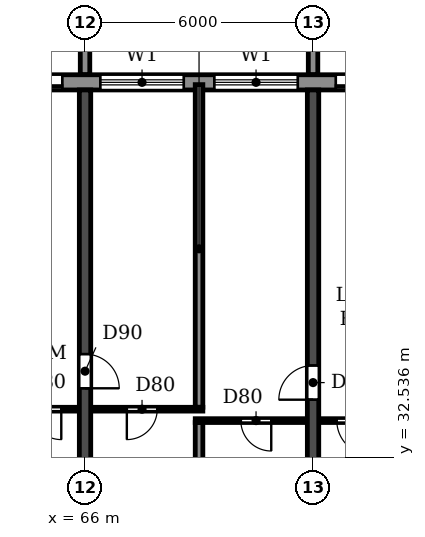
"""IFC4 building model, lengths in metres.
Left out: names, types, materials, properties, quantities, classifications, styles, units other than length and angle.
Written with IfcOpenShell. Run it as: python <this file> out.ifc"""

import sys

from ifc_helpers import new_model, si_unit, direction, frame, frame_2d, origin, place, context, subcontext, project, spatial, polyline, rectangle, outline, extrude, source, transform, mapped, element, fill, save


model = new_model("IFC4")
c1 = context("Model", 3, precision=1e-05, world=origin(), true_north=direction((0.0, 1.0)))
c2 = subcontext(c1, "Body", "Model", "MODEL_VIEW")
j1 = project(units=[si_unit("LENGTHUNIT", "METRE"), si_unit("PLANEANGLEUNIT", "RADIAN")], contexts=[c1])
p1 = place(None, origin())
s1 = spatial("IfcSite", under=j1, at=p1, CompositionType="ELEMENT")
p2 = place(p1, origin())
s2 = spatial("IfcBuilding", under=s1, at=p2, CompositionType="ELEMENT")
p3 = place(p2, frame((0.0, 0.0, 152.1)))
s3 = spatial("IfcBuildingStorey", under=s2, at=p3, CompositionType="ELEMENT", Elevation=152.1)
p4 = place(p3, frame((66.0, 30.525, 0.0), z_axis=(0.0, 0.0, 1.0), x_axis=(0.0, 1.0, 0.0)))
e1 = element("IfcWall", 1, at=p4, inside=s3, PredefinedType="SHEAR", context=c2, shape_type="SweptSolid", body=[
    extrude(rectangle(XDim=11.675, YDim=0.3, at=frame_2d((5.837, 0.0))), origin(), (0.0, 0.0, 1.0), 3.07),
])
p5 = place(p4, frame((3.825, 0.0, 0.0)))
e2 = element("IfcOpeningElement", 2, at=p5, cuts=e1, PredefinedType="OPENING", context=c2, shape_type="SweptSolid", body=[
    extrude(rectangle(XDim=0.9, YDim=2.1, at=frame_2d((0.45, 1.05))), frame((0.0, 0.16, 0.0), z_axis=(0.0, -1.0, 0.0), x_axis=(1.0, 0.0, 0.0)), (0.0, 0.0, 1.0), 0.32),
])
p6 = place(p3, frame((72.0, 30.525, 0.0), z_axis=(0.0, 0.0, 1.0), x_axis=(0.0, 1.0, 0.0)))
e3 = element("IfcWall", 3, at=p6, inside=s3, PredefinedType="SHEAR", context=c2, shape_type="SweptSolid", body=[
    extrude(rectangle(XDim=11.675, YDim=0.3, at=frame_2d((5.837, 0.0))), origin(), (0.0, 0.0, 1.0), 3.07),
])
p7 = place(p6, frame((3.525, 0.0, 0.0)))
e4 = element("IfcOpeningElement", 4, at=p7, cuts=e3, PredefinedType="OPENING", context=c2, shape_type="SweptSolid", body=[
    extrude(rectangle(XDim=0.9, YDim=2.1, at=frame_2d((0.45, 1.05))), frame((0.0, 0.16, 0.0), z_axis=(0.0, -1.0, 0.0), x_axis=(1.0, 0.0, 0.0)), (0.0, 0.0, 1.0), 0.32),
])
p8 = place(p3, frame((85.317, 42.4, 0.0), z_axis=(0.0, 0.0, 1.0), x_axis=(-1.0, 0.0, 0.0)))
e5 = element("IfcWall", 5, at=p8, inside=s3, PredefinedType="STANDARD", context=c2, shape_type="SweptSolid", body=[
    extrude(rectangle(XDim=68.634, YDim=0.4, at=frame_2d((34.317, 0.0))), origin(), (0.0, 0.0, 1.0), 3.07),
])
p9 = place(p8, frame((64.917, 0.0, 0.0)))
e6 = element("IfcOpeningElement", 6, at=p9, cuts=e5, PredefinedType="OPENING", context=c2, shape_type="SweptSolid", body=[
    extrude(rectangle(XDim=1.8, YDim=2.4, at=frame_2d((0.9, 1.2))), frame((0.0, 0.21, 0.0), z_axis=(0.0, -1.0, 0.0), x_axis=(1.0, 0.0, 0.0)), (0.0, 0.0, 1.0), 0.42),
])
p10 = place(p8, frame((61.717, 0.0, 0.9)))
e7 = element("IfcOpeningElement", 7, at=p10, cuts=e5, PredefinedType="OPENING", context=c2, shape_type="SweptSolid", body=[
    extrude(rectangle(XDim=2.2, YDim=1.5, at=frame_2d((1.1, 0.75))), frame((0.0, 0.21, 0.0), z_axis=(0.0, -1.0, 0.0), x_axis=(1.0, 0.0, 0.0)), (0.0, 0.0, 1.0), 0.42),
])
p11 = place(p8, frame((58.717, 0.0, 0.9)))
e8 = element("IfcOpeningElement", 8, at=p11, cuts=e5, PredefinedType="OPENING", context=c2, shape_type="SweptSolid", body=[
    extrude(rectangle(XDim=2.2, YDim=1.5, at=frame_2d((1.1, 0.75))), frame((0.0, 0.21, 0.0), z_axis=(0.0, -1.0, 0.0), x_axis=(1.0, 0.0, 0.0)), (0.0, 0.0, 1.0), 0.42),
])
p12 = place(p8, frame((55.917, 0.0, 0.0)))
e9 = element("IfcOpeningElement", 9, at=p12, cuts=e5, PredefinedType="OPENING", context=c2, shape_type="SweptSolid", body=[
    extrude(rectangle(XDim=1.8, YDim=2.4, at=frame_2d((0.9, 1.2))), frame((0.0, 0.21, 0.0), z_axis=(0.0, -1.0, 0.0), x_axis=(1.0, 0.0, 0.0)), (0.0, 0.0, 1.0), 0.42),
])
p13 = place(p8, frame((52.917, 0.0, 0.0)))
e10 = element("IfcOpeningElement", 10, at=p13, cuts=e5, PredefinedType="OPENING", context=c2, shape_type="SweptSolid", body=[
    extrude(rectangle(XDim=1.8, YDim=2.4, at=frame_2d((0.9, 1.2))), frame((0.0, 0.21, 0.0), z_axis=(0.0, -1.0, 0.0), x_axis=(1.0, 0.0, 0.0)), (0.0, 0.0, 1.0), 0.42),
])
p14 = place(p8, frame((49.717, 0.0, 0.9)))
e11 = element("IfcOpeningElement", 11, at=p14, cuts=e5, PredefinedType="OPENING", context=c2, shape_type="SweptSolid", body=[
    extrude(rectangle(XDim=2.2, YDim=1.5, at=frame_2d((1.1, 0.75))), frame((0.0, 0.21, 0.0), z_axis=(0.0, -1.0, 0.0), x_axis=(1.0, 0.0, 0.0)), (0.0, 0.0, 1.0), 0.42),
])
p15 = place(p8, frame((46.717, 0.0, 0.9)))
e12 = element("IfcOpeningElement", 12, at=p15, cuts=e5, PredefinedType="OPENING", context=c2, shape_type="SweptSolid", body=[
    extrude(rectangle(XDim=2.2, YDim=1.5, at=frame_2d((1.1, 0.75))), frame((0.0, 0.21, 0.0), z_axis=(0.0, -1.0, 0.0), x_axis=(1.0, 0.0, 0.0)), (0.0, 0.0, 1.0), 0.42),
])
p16 = place(p8, frame((43.717, 0.0, 0.9)))
e13 = element("IfcOpeningElement", 13, at=p16, cuts=e5, PredefinedType="OPENING", context=c2, shape_type="SweptSolid", body=[
    extrude(rectangle(XDim=2.2, YDim=1.5, at=frame_2d((1.1, 0.75))), frame((0.0, 0.21, 0.0), z_axis=(0.0, -1.0, 0.0), x_axis=(1.0, 0.0, 0.0)), (0.0, 0.0, 1.0), 0.42),
])
p17 = place(p8, frame((40.917, 0.0, 0.0)))
e14 = element("IfcOpeningElement", 14, at=p17, cuts=e5, PredefinedType="OPENING", context=c2, shape_type="SweptSolid", body=[
    extrude(rectangle(XDim=1.8, YDim=2.4, at=frame_2d((0.9, 1.2))), frame((0.0, 0.21, 0.0), z_axis=(0.0, -1.0, 0.0), x_axis=(1.0, 0.0, 0.0)), (0.0, 0.0, 1.0), 0.42),
])
p18 = place(p8, frame((37.717, 0.0, 0.9)))
e15 = element("IfcOpeningElement", 15, at=p18, cuts=e5, PredefinedType="OPENING", context=c2, shape_type="SweptSolid", body=[
    extrude(rectangle(XDim=2.2, YDim=1.5, at=frame_2d((1.1, 0.75))), frame((0.0, 0.21, 0.0), z_axis=(0.0, -1.0, 0.0), x_axis=(1.0, 0.0, 0.0)), (0.0, 0.0, 1.0), 0.42),
])
p19 = place(p8, frame((34.917, 0.0, 0.0)))
e16 = element("IfcOpeningElement", 16, at=p19, cuts=e5, PredefinedType="OPENING", context=c2, shape_type="SweptSolid", body=[
    extrude(rectangle(XDim=1.8, YDim=2.4, at=frame_2d((0.9, 1.2))), frame((0.0, 0.21, 0.0), z_axis=(0.0, -1.0, 0.0), x_axis=(1.0, 0.0, 0.0)), (0.0, 0.0, 1.0), 0.42),
])
p20 = place(p8, frame((31.717, 0.0, 0.9)))
e17 = element("IfcOpeningElement", 17, at=p20, cuts=e5, PredefinedType="OPENING", context=c2, shape_type="SweptSolid", body=[
    extrude(rectangle(XDim=2.2, YDim=1.5, at=frame_2d((1.1, 0.75))), frame((0.0, 0.21, 0.0), z_axis=(0.0, -1.0, 0.0), x_axis=(1.0, 0.0, 0.0)), (0.0, 0.0, 1.0), 0.42),
])
p21 = place(p8, frame((28.717, 0.0, 0.9)))
e18 = element("IfcOpeningElement", 18, at=p21, cuts=e5, PredefinedType="OPENING", context=c2, shape_type="SweptSolid", body=[
    extrude(rectangle(XDim=2.2, YDim=1.5, at=frame_2d((1.1, 0.75))), frame((0.0, 0.21, 0.0), z_axis=(0.0, -1.0, 0.0), x_axis=(1.0, 0.0, 0.0)), (0.0, 0.0, 1.0), 0.42),
])
p22 = place(p8, frame((25.717, 0.0, 0.9)))
e19 = element("IfcOpeningElement", 19, at=p22, cuts=e5, PredefinedType="OPENING", context=c2, shape_type="SweptSolid", body=[
    extrude(rectangle(XDim=2.2, YDim=1.5, at=frame_2d((1.1, 0.75))), frame((0.0, 0.21, 0.0), z_axis=(0.0, -1.0, 0.0), x_axis=(1.0, 0.0, 0.0)), (0.0, 0.0, 1.0), 0.42),
])
p23 = place(p8, frame((22.717, 0.0, 0.9)))
e20 = element("IfcOpeningElement", 20, at=p23, cuts=e5, PredefinedType="OPENING", context=c2, shape_type="SweptSolid", body=[
    extrude(rectangle(XDim=2.2, YDim=1.5, at=frame_2d((1.1, 0.75))), frame((0.0, 0.21, 0.0), z_axis=(0.0, -1.0, 0.0), x_axis=(1.0, 0.0, 0.0)), (0.0, 0.0, 1.0), 0.42),
])
p24 = place(p8, frame((19.917, 0.0, 0.0)))
e21 = element("IfcOpeningElement", 21, at=p24, cuts=e5, PredefinedType="OPENING", context=c2, shape_type="SweptSolid", body=[
    extrude(rectangle(XDim=1.8, YDim=2.4, at=frame_2d((0.9, 1.2))), frame((0.0, 0.21, 0.0), z_axis=(0.0, -1.0, 0.0), x_axis=(1.0, 0.0, 0.0)), (0.0, 0.0, 1.0), 0.42),
])
p25 = place(p8, frame((16.717, 0.0, 0.9)))
e22 = element("IfcOpeningElement", 22, at=p25, cuts=e5, PredefinedType="OPENING", context=c2, shape_type="SweptSolid", body=[
    extrude(rectangle(XDim=2.2, YDim=1.5, at=frame_2d((1.1, 0.75))), frame((0.0, 0.21, 0.0), z_axis=(0.0, -1.0, 0.0), x_axis=(1.0, 0.0, 0.0)), (0.0, 0.0, 1.0), 0.42),
])
p26 = place(p8, frame((13.717, 0.0, 0.9)))
e23 = element("IfcOpeningElement", 23, at=p26, cuts=e5, PredefinedType="OPENING", context=c2, shape_type="SweptSolid", body=[
    extrude(rectangle(XDim=2.2, YDim=1.5, at=frame_2d((1.1, 0.75))), frame((0.0, 0.21, 0.0), z_axis=(0.0, -1.0, 0.0), x_axis=(1.0, 0.0, 0.0)), (0.0, 0.0, 1.0), 0.42),
])
p27 = place(p8, frame((10.917, 0.0, 0.0)))
e24 = element("IfcOpeningElement", 24, at=p27, cuts=e5, PredefinedType="OPENING", context=c2, shape_type="SweptSolid", body=[
    extrude(rectangle(XDim=1.8, YDim=2.4, at=frame_2d((0.9, 1.2))), frame((0.0, 0.21, 0.0), z_axis=(0.0, -1.0, 0.0), x_axis=(1.0, 0.0, 0.0)), (0.0, 0.0, 1.0), 0.42),
])
p28 = place(p8, frame((7.717, 0.0, 0.9)))
e25 = element("IfcOpeningElement", 25, at=p28, cuts=e5, PredefinedType="OPENING", context=c2, shape_type="SweptSolid", body=[
    extrude(rectangle(XDim=2.2, YDim=1.5, at=frame_2d((1.1, 0.75))), frame((0.0, 0.21, 0.0), z_axis=(0.0, -1.0, 0.0), x_axis=(1.0, 0.0, 0.0)), (0.0, 0.0, 1.0), 0.42),
])
p29 = place(p8, frame((4.717, 0.0, 0.9)))
e26 = element("IfcOpeningElement", 26, at=p29, cuts=e5, PredefinedType="OPENING", context=c2, shape_type="SweptSolid", body=[
    extrude(rectangle(XDim=2.2, YDim=1.5, at=frame_2d((1.1, 0.75))), frame((0.0, 0.21, 0.0), z_axis=(0.0, -1.0, 0.0), x_axis=(1.0, 0.0, 0.0)), (0.0, 0.0, 1.0), 0.42),
])
p30 = place(p8, frame((1.917, 0.0, 0.0)))
e27 = element("IfcOpeningElement", 27, at=p30, cuts=e5, PredefinedType="OPENING", context=c2, shape_type="SweptSolid", body=[
    extrude(rectangle(XDim=1.8, YDim=2.4, at=frame_2d((0.9, 1.2))), frame((0.0, 0.21, 0.0), z_axis=(0.0, -1.0, 0.0), x_axis=(1.0, 0.0, 0.0)), (0.0, 0.0, 1.0), 0.42),
])
m1 = source(origin(), c2, "Body", "SweptSolid", [
    extrude(outline(polyline([(0.0, 0.0), (0.25, 0.0), (0.25, 3.1), (0.0, 3.1), (0.0, 0.0)])), origin(), (0.0, 0.0, 1.0), 3.1),
])
for number, where in (
    (28, (65.875, 42.6, 0.0)),
    (29, (71.875, 42.6, 0.0)),
):
    element("IfcWall", number, at=place(p3, frame(where)), inside=s3, PredefinedType="STANDARD", context=c2, shape_type="MappedRepresentation", body=[
        mapped(m1, transform((0.0, 0.0, 0.0))),
    ])
p31 = place(p3, frame((69.0, 30.535, 0.0), z_axis=(0.0, 0.0, 1.0), x_axis=(0.0, 1.0, 0.0)))
e30 = element("IfcWall", 30, at=p31, inside=s3, PredefinedType="PARTITIONING", context=c2, shape_type="SweptSolid", body=[
    extrude(rectangle(XDim=2.915, YDim=0.2, at=frame_2d((1.458, 0.0))), origin(), (0.0, 0.0, 1.0), 3.07),
])
p32 = place(p3, frame((69.0, 33.85, 0.0), z_axis=(0.0, 0.0, 1.0), x_axis=(0.0, 1.0, 0.0)))
e31 = element("IfcWall", 31, at=p32, inside=s3, PredefinedType="PARTITIONING", context=c2, shape_type="SweptSolid", body=[
    extrude(rectangle(XDim=8.49, YDim=0.2, at=frame_2d((4.245, 0.0))), origin(), (0.0, 0.0, 1.0), 3.07),
])
p33 = place(p3, frame((68.9, 33.5, 0.0), z_axis=(0.0, 0.0, 1.0), x_axis=(1.0, 0.0, 0.0)))
e32 = element("IfcWall", 32, at=p33, inside=s3, PredefinedType="PARTITIONING", context=c2, shape_type="SweptSolid", body=[
    extrude(rectangle(XDim=2.94, YDim=0.1, at=frame_2d((1.47, 0.0))), origin(), (0.0, 0.0, 1.0), 3.07),
])
p34 = place(p33, frame((1.2, 0.0, 0.0)))
e33 = element("IfcOpeningElement", 33, at=p34, cuts=e32, PredefinedType="OPENING", context=c2, shape_type="SweptSolid", body=[
    extrude(rectangle(XDim=0.8, YDim=2.1, at=frame_2d((0.4, 1.05))), frame((0.0, 0.06, 0.0), z_axis=(0.0, -1.0, 0.0), x_axis=(1.0, 0.0, 0.0)), (0.0, 0.0, 1.0), 0.12),
])
p35 = place(p3, frame((72.16, 33.5, 0.0), z_axis=(0.0, 0.0, 1.0), x_axis=(1.0, 0.0, 0.0)))
e34 = element("IfcWall", 34, at=p35, inside=s3, PredefinedType="PARTITIONING", context=c2, shape_type="SweptSolid", body=[
    extrude(rectangle(XDim=2.04, YDim=0.1, at=frame_2d((1.02, 0.0))), origin(), (0.0, 0.0, 1.0), 3.07),
])
p36 = place(p35, frame((0.465, 0.0, 0.0)))
e35 = element("IfcOpeningElement", 35, at=p36, cuts=e34, PredefinedType="OPENING", context=c2, shape_type="SweptSolid", body=[
    extrude(rectangle(XDim=0.9, YDim=2.1, at=frame_2d((0.45, 1.05))), frame((0.0, 0.06, 0.0), z_axis=(0.0, -1.0, 0.0), x_axis=(1.0, 0.0, 0.0)), (0.0, 0.0, 1.0), 0.12),
])
p37 = place(p3, frame((63.9, 33.8, 0.0), z_axis=(0.0, 0.0, 1.0), x_axis=(1.0, 0.0, 0.0)))
e36 = element("IfcWall", 36, at=p37, inside=s3, PredefinedType="PARTITIONING", context=c2, shape_type="SweptSolid", body=[
    extrude(rectangle(XDim=1.94, YDim=0.1, at=frame_2d((0.97, 0.0))), origin(), (0.0, 0.0, 1.0), 3.07),
])
p38 = place(p37, frame((0.675, 0.0, 0.0)))
e37 = element("IfcOpeningElement", 37, at=p38, cuts=e36, PredefinedType="OPENING", context=c2, shape_type="SweptSolid", body=[
    extrude(rectangle(XDim=0.8, YDim=2.1, at=frame_2d((0.4, 1.05))), frame((0.0, 0.06, 0.0), z_axis=(0.0, -1.0, 0.0), x_axis=(1.0, 0.0, 0.0)), (0.0, 0.0, 1.0), 0.12),
])
p39 = place(p3, frame((66.16, 33.8, 0.0), z_axis=(0.0, 0.0, 1.0), x_axis=(1.0, 0.0, 0.0)))
e38 = element("IfcWall", 38, at=p39, inside=s3, PredefinedType="PARTITIONING", context=c2, shape_type="SweptSolid", body=[
    extrude(rectangle(XDim=2.94, YDim=0.1, at=frame_2d((1.47, 0.0))), origin(), (0.0, 0.0, 1.0), 3.07),
])
p40 = place(p39, frame((0.94, 0.0, 0.0)))
e39 = element("IfcOpeningElement", 39, at=p40, cuts=e38, PredefinedType="OPENING", context=c2, shape_type="SweptSolid", body=[
    extrude(rectangle(XDim=0.8, YDim=2.1, at=frame_2d((0.4, 1.05))), frame((0.0, 0.06, 0.0), z_axis=(0.0, -1.0, 0.0), x_axis=(1.0, 0.0, 0.0)), (0.0, 0.0, 1.0), 0.12),
])
p41 = place(p24, origin())
e40 = element("IfcDoor", 40, at=p41, inside=s3, OperationType="DOUBLE_DOOR_SLIDING", PredefinedType="DOOR", context=c2, shape_type="SweptSolid", body=[
    extrude(rectangle(XDim=1.8, YDim=2.4, at=frame_2d((0.9, 1.2))), frame((0.0, 0.025, 0.0), z_axis=(0.0, -1.0, 0.0), x_axis=(1.0, 0.0, 0.0)), (0.0, 0.0, 1.0), 0.05),
])
fill(e21, e40)
p42 = place(p25, origin())
e41 = element("IfcWindow", 41, at=p42, inside=s3, PartitioningType="DOUBLE_PANEL_HORIZONTAL", PredefinedType="WINDOW", context=c2, shape_type="SweptSolid", body=[
    extrude(rectangle(XDim=2.2, YDim=1.5, at=frame_2d((1.1, 0.75))), frame((0.0, 0.03, 0.0), z_axis=(0.0, -1.0, 0.0), x_axis=(1.0, 0.0, 0.0)), (0.0, 0.0, 1.0), 0.06),
])
fill(e22, e41)
p43 = place(p26, origin())
e42 = element("IfcWindow", 42, at=p43, inside=s3, PartitioningType="DOUBLE_PANEL_HORIZONTAL", PredefinedType="WINDOW", context=c2, shape_type="SweptSolid", body=[
    extrude(rectangle(XDim=2.2, YDim=1.5, at=frame_2d((1.1, 0.75))), frame((0.0, 0.03, 0.0), z_axis=(0.0, -1.0, 0.0), x_axis=(1.0, 0.0, 0.0)), (0.0, 0.0, 1.0), 0.06),
])
fill(e23, e42)
p44 = place(p27, origin())
e43 = element("IfcDoor", 43, at=p44, inside=s3, OperationType="DOUBLE_DOOR_SLIDING", PredefinedType="DOOR", context=c2, shape_type="SweptSolid", body=[
    extrude(rectangle(XDim=1.8, YDim=2.4, at=frame_2d((0.9, 1.2))), frame((0.0, 0.025, 0.0), z_axis=(0.0, -1.0, 0.0), x_axis=(1.0, 0.0, 0.0)), (0.0, 0.0, 1.0), 0.05),
])
fill(e24, e43)
p45 = place(p40, frame((0.8, 0.0, 0.0), z_axis=(0.0, 0.0, 1.0), x_axis=(-1.0, 0.0, 0.0)))
e44 = element("IfcDoor", 44, at=p45, inside=s3, OperationType="SINGLE_SWING_RIGHT", PredefinedType="DOOR", context=c2, shape_type="SweptSolid", body=[
    extrude(rectangle(XDim=0.8, YDim=2.1, at=frame_2d((0.4, 1.05))), frame((0.0, 0.025, 0.0), z_axis=(0.0, -1.0, 0.0), x_axis=(1.0, 0.0, 0.0)), (0.0, 0.0, 1.0), 0.05),
])
fill(e39, e44)
p46 = place(p38, frame((0.8, 0.0, 0.0), z_axis=(0.0, 0.0, 1.0), x_axis=(-1.0, 0.0, 0.0)))
e45 = element("IfcDoor", 45, at=p46, inside=s3, OperationType="SINGLE_SWING_LEFT", PredefinedType="DOOR", context=c2, shape_type="SweptSolid", body=[
    extrude(rectangle(XDim=0.8, YDim=2.1, at=frame_2d((0.4, 1.05))), frame((0.0, 0.025, 0.0), z_axis=(0.0, -1.0, 0.0), x_axis=(1.0, 0.0, 0.0)), (0.0, 0.0, 1.0), 0.05),
])
fill(e37, e45)
p47 = place(p5, frame((0.9, 0.0, 0.0), z_axis=(0.0, 0.0, 1.0), x_axis=(-1.0, 0.0, 0.0)))
e46 = element("IfcDoor", 46, at=p47, inside=s3, OperationType="SINGLE_SWING_RIGHT", PredefinedType="DOOR", context=c2, shape_type="SweptSolid", body=[
    extrude(rectangle(XDim=0.9, YDim=2.1, at=frame_2d((0.45, 1.05))), frame((0.0, 0.025, 0.0), z_axis=(0.0, -1.0, 0.0), x_axis=(1.0, 0.0, 0.0)), (0.0, 0.0, 1.0), 0.05),
])
fill(e2, e46)
p48 = place(p34, frame((0.8, 0.0, 0.0), z_axis=(0.0, 0.0, 1.0), x_axis=(-1.0, 0.0, 0.0)))
e47 = element("IfcDoor", 47, at=p48, inside=s3, OperationType="SINGLE_SWING_LEFT", PredefinedType="DOOR", context=c2, shape_type="SweptSolid", body=[
    extrude(rectangle(XDim=0.8, YDim=2.1, at=frame_2d((0.4, 1.05))), frame((0.0, 0.025, 0.0), z_axis=(0.0, -1.0, 0.0), x_axis=(1.0, 0.0, 0.0)), (0.0, 0.0, 1.0), 0.05),
])
fill(e33, e47)
p49 = place(p7, origin())
e48 = element("IfcDoor", 48, at=p49, inside=s3, OperationType="SINGLE_SWING_LEFT", PredefinedType="DOOR", context=c2, shape_type="SweptSolid", body=[
    extrude(rectangle(XDim=0.9, YDim=2.1, at=frame_2d((0.45, 1.05))), frame((0.0, 0.025, 0.0), z_axis=(0.0, -1.0, 0.0), x_axis=(1.0, 0.0, 0.0)), (0.0, 0.0, 1.0), 0.05),
])
fill(e4, e48)
p50 = place(p36, frame((0.9, 0.0, 0.0), z_axis=(0.0, 0.0, 1.0), x_axis=(-1.0, 0.0, 0.0)))
e49 = element("IfcDoor", 49, at=p50, inside=s3, OperationType="SINGLE_SWING_LEFT", PredefinedType="DOOR", context=c2, shape_type="SweptSolid", body=[
    extrude(rectangle(XDim=0.9, YDim=2.1, at=frame_2d((0.45, 1.05))), frame((0.0, 0.025, 0.0), z_axis=(0.0, -1.0, 0.0), x_axis=(1.0, 0.0, 0.0)), (0.0, 0.0, 1.0), 0.05),
])
fill(e35, e49)
save(model, sys.argv[1])
